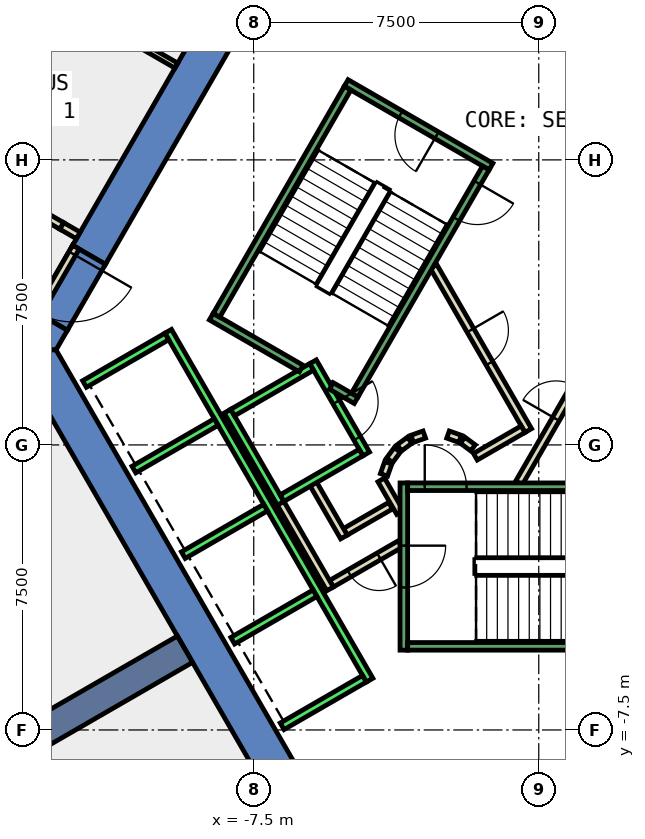
"""IFC4 building model, lengths in metres.
Left out: names, types, materials, properties, quantities, classifications, styles, units other than length and angle.
Written with IfcOpenShell. Run it as: python <this file> out.ifc"""

import sys

from ifc_helpers import new_model, si_unit, direction, frame, frame_2d, origin, place, context, subcontext, project, spatial, polyline, rectangle, outline, extrude, element, fill, save


model = new_model("IFC4")
c1 = context("Model", 3, precision=1e-05, world=origin(), true_north=direction((0.0, 1.0)))
c2 = subcontext(c1, "Body", "Model", "MODEL_VIEW")
j1 = project(units=[si_unit("LENGTHUNIT", "METRE"), si_unit("PLANEANGLEUNIT", "RADIAN")], contexts=[c1])
p1 = place(None, origin())
s1 = spatial("IfcSite", under=j1, at=p1, CompositionType="ELEMENT")
p2 = place(p1, origin())
s2 = spatial("IfcBuilding", under=s1, at=p2, CompositionType="ELEMENT")
p3 = place(p2, frame((0.0, 0.0, 51.8)))
s3 = spatial("IfcBuildingStorey", under=s2, at=p3, CompositionType="ELEMENT", Elevation=51.8)
p4 = place(p3, frame((0.0, 0.0, -0.4)))
e1 = element("IfcWall", 1, at=p4, inside=s3, PredefinedType="SHEAR", context=c2, shape_type="SweptSolid", body=[
    extrude(outline(polyline([(-12.267, 5.252), (-11.402, 4.752), (-6.351, 13.5), (-6.928, 14.5), (-12.267, 5.252)])), origin(), (0.0, 0.0, 1.0), 4.2),
])
p5 = place(p3, frame((0.0, 0.0, -0.4)))
e2 = element("IfcWall", 2, at=p5, inside=s3, PredefinedType="SHEAR", context=c2, shape_type="SweptSolid", body=[
    extrude(outline(polyline([(-12.402, 3.02), (-13.267, 3.52), (-13.856, 2.5), (-12.702, 2.5), (-12.402, 3.02)])), origin(), (0.0, 0.0, 1.0), 4.2),
])
p6 = place(p3, frame((0.0, 0.0, 3.6)))
e3 = element("IfcWall", 3, at=p6, inside=s3, PredefinedType="SHEAR", context=c2, shape_type="SweptSolid", body=[
    extrude(outline(polyline([(-13.267, 3.52), (-12.402, 3.02), (-11.402, 4.752), (-12.267, 5.252), (-13.267, 3.52)])), origin(), (0.0, 0.0, 1.0), 0.2),
])
p7 = place(p3, frame((0.0, 0.0, -0.4)))
e4 = element("IfcWall", 4, at=p7, inside=s3, PredefinedType="SHEAR", context=c2, shape_type="SweptSolid", body=[
    extrude(outline(polyline([(-13.856, 2.5), (-6.928, -9.5), (-6.351, -8.5), (-12.702, 2.5), (-13.856, 2.5)])), origin(), (0.0, 0.0, 1.0), 4.2),
])
p8 = place(p3, frame((-9.31, -5.375, -0.4), z_axis=(0.0, 0.0, 1.0), x_axis=(-0.866017533419, -0.500013631625, 0.0)))
e5 = element("IfcWall", 5, at=p8, inside=s3, PredefinedType="SHEAR", context=c2, shape_type="SweptSolid", body=[
    extrude(rectangle(XDim=9.0, YDim=0.8, at=frame_2d((4.5, 0.0))), origin(), (0.0, 0.0, 1.0), 4.2),
])
p9 = place(p3, frame((-16.96, 8.308, 0.0), z_axis=(0.0, 0.0, 1.0), x_axis=(0.866018717003, -0.500011581666, 0.0)))
e6 = element("IfcWall", 6, at=p9, inside=s3, PredefinedType="PARTITIONING", context=c2, shape_type="SweptSolid", body=[
    extrude(rectangle(XDim=5.092, YDim=0.2, at=frame_2d((2.546, 0.0))), origin(), (0.0, 0.0, 1.0), 3.8),
])
p10 = place(p9, frame((2.296, 0.0, 0.0)))
e7 = element("IfcOpeningElement", 7, at=p10, cuts=e6, PredefinedType="OPENING", context=c2, shape_type="SweptSolid", body=[
    extrude(rectangle(XDim=1.0, YDim=2.1, at=frame_2d((0.5, 1.05))), frame((0.0, 0.11, 0.0), z_axis=(0.0, -1.0, 0.0), x_axis=(1.0, 0.0, 0.0)), (0.0, 0.0, 1.0), 0.22),
])
p11 = place(p3, frame((-3.9, -1.599, 0.0), z_axis=(0.0, 0.0, 1.0), x_axis=(-0.865969445389, -0.500096910261, 0.0)))
e8 = element("IfcWall", 8, at=p11, inside=s3, PredefinedType="PARTITIONING", context=c2, shape_type="SweptSolid", body=[
    extrude(rectangle(XDim=1.373, YDim=0.2, at=frame_2d((0.687, 0.0))), origin(), (0.0, 0.0, 1.0), 3.8),
])
p12 = place(p3, frame((-5.126, -2.422, 0.0), z_axis=(0.0, 0.0, 1.0), x_axis=(-0.500062241894, 0.865989465428, 0.0)))
e9 = element("IfcWall", 9, at=p12, inside=s3, PredefinedType="PARTITIONING", context=c2, shape_type="SweptSolid", body=[
    extrude(rectangle(XDim=1.7, YDim=0.2, at=frame_2d((0.85, 0.0))), origin(), (0.0, 0.0, 1.0), 3.8),
])
p13 = place(p3, frame((-3.65, -2.61, 0.0), z_axis=(0.0, 0.0, 1.0), x_axis=(-0.866072462134, -0.499918483688, 0.0)))
e10 = element("IfcWall", 10, at=p13, inside=s3, PredefinedType="PARTITIONING", context=c2, shape_type="SweptSolid", body=[
    extrude(rectangle(XDim=2.084, YDim=0.2, at=frame_2d((1.042, 0.0))), origin(), (0.0, 0.0, 1.0), 3.8),
])
p14 = place(p13, frame((0.642, 0.0, 0.0)))
e11 = element("IfcOpeningElement", 11, at=p14, cuts=e10, PredefinedType="OPENING", context=c2, shape_type="SweptSolid", body=[
    extrude(rectangle(XDim=0.9, YDim=2.1, at=frame_2d((0.45, 1.05))), frame((0.0, 0.11, 0.0), z_axis=(0.0, -1.0, 0.0), x_axis=(1.0, 0.0, 0.0)), (0.0, 0.0, 1.0), 0.22),
])
p15 = place(p3, frame((-5.492, -3.788, 0.0), z_axis=(0.0, 0.0, 1.0), x_axis=(-0.500008949224, 0.866020236886, 0.0)))
e12 = element("IfcWall", 12, at=p15, inside=s3, PredefinedType="PARTITIONING", context=c2, shape_type="SweptSolid", body=[
    extrude(rectangle(XDim=2.68, YDim=0.2, at=frame_2d((1.34, 0.0))), origin(), (0.0, 0.0, 1.0), 3.8),
])
p16 = place(p3, frame((-4.145, -0.92, 0.0), z_axis=(0.0, 0.0, 1.0), x_axis=(0.499743786207, -0.866173278362, 0.0)))
e13 = element("IfcWall", 13, at=p16, inside=s3, PredefinedType="PARTITIONING", context=c2, shape_type="SweptSolid", body=[
    extrude(rectangle(XDim=0.991, YDim=0.2, at=frame_2d((0.495, 0.0))), origin(), (0.0, 0.0, 1.0), 3.8),
])
p17 = place(p3, frame((-14.377, 12.775, 0.0), z_axis=(0.0, 0.0, 1.0), x_axis=(0.866051730117, -0.499954398681, 0.0)))
e14 = element("IfcWall", 14, at=p17, inside=s3, PredefinedType="PARTITIONING", context=c2, shape_type="SweptSolid", body=[
    extrude(rectangle(XDim=5.588, YDim=0.15, at=frame_2d((2.794, 0.0))), origin(), (0.0, 0.0, 1.0), 3.8),
])
p18 = place(p3, frame((-0.52, -1.0, 0.0), z_axis=(0.0, 0.0, 1.0), x_axis=(0.50011622646, 0.865958290007, 0.0)))
e15 = element("IfcWall", 15, at=p18, inside=s3, PredefinedType="PARTITIONING", context=c2, shape_type="SweptSolid", body=[
    extrude(rectangle(XDim=4.991, YDim=0.2, at=frame_2d((2.496, 0.0))), origin(), (0.0, 0.0, 1.0), 3.8),
])
p19 = place(p18, frame((1.945, 0.0, 0.0)))
e16 = element("IfcOpeningElement", 16, at=p19, cuts=e15, PredefinedType="OPENING", context=c2, shape_type="SweptSolid", body=[
    extrude(rectangle(XDim=1.0, YDim=2.1, at=frame_2d((0.5, 1.05))), frame((0.0, 0.11, 0.0), z_axis=(0.0, -1.0, 0.0), x_axis=(1.0, 0.0, 0.0)), (0.0, 0.0, 1.0), 0.22),
])
p20 = place(p3, frame((-2.771, 4.7, 0.0), z_axis=(0.0, 0.0, 1.0), x_axis=(0.499969479948, -0.866043023828, 0.0)))
e17 = element("IfcWall", 17, at=p20, inside=s3, PredefinedType="PARTITIONING", context=c2, shape_type="SweptSolid", body=[
    extrude(rectangle(XDim=4.99, YDim=0.2, at=frame_2d((2.495, 0.0))), origin(), (0.0, 0.0, 1.0), 3.8),
])
p21 = place(p20, frame((1.945, 0.0, 0.0)))
e18 = element("IfcOpeningElement", 18, at=p21, cuts=e17, PredefinedType="OPENING", context=c2, shape_type="SweptSolid", body=[
    extrude(rectangle(XDim=1.0, YDim=2.1, at=frame_2d((0.5, 1.05))), frame((0.0, 0.11, 0.0), z_axis=(0.0, -1.0, 0.0), x_axis=(1.0, 0.0, 0.0)), (0.0, 0.0, 1.0), 0.22),
])
p22 = place(p3, frame((-0.412, 0.414, 0.0), z_axis=(0.0, 0.0, 1.0), x_axis=(-0.866017369001, -0.500013916395, 0.0)))
e19 = element("IfcWall", 19, at=p22, inside=s3, PredefinedType="PARTITIONING", context=c2, shape_type="SweptSolid", body=[
    extrude(rectangle(XDim=1.45, YDim=0.2, at=frame_2d((0.725, 0.0))), origin(), (0.0, 0.0, 1.0), 3.8),
])
p23 = place(p3, frame((-1.731, -0.077, 0.0), z_axis=(0.0, 0.0, 1.0), x_axis=(-0.804311165252, 0.594208338422, 0.0)))
e20 = element("IfcWall", 20, at=p23, inside=s3, PredefinedType="PARTITIONING", context=c2, shape_type="SweptSolid", body=[
    extrude(rectangle(XDim=0.338, YDim=0.2, at=frame_2d((0.169, 0.0))), origin(), (0.0, 0.0, 1.0), 3.8),
])
p24 = place(p3, frame((-2.07, 0.16, 0.0), z_axis=(0.0, 0.0, 1.0), x_axis=(-0.942199461132, 0.335052496547, 0.0)))
e21 = element("IfcWall", 21, at=p24, inside=s3, PredefinedType="PARTITIONING", context=c2, shape_type="SweptSolid", body=[
    extrude(rectangle(XDim=0.337, YDim=0.2, at=frame_2d((0.169, 0.0))), origin(), (0.0, 0.0, 1.0), 3.8),
])
p25 = place(p3, frame((-3.012, 0.273, 0.0), z_axis=(0.0, 0.0, 1.0), x_axis=(-0.942280615813, -0.334824194261, 0.0)))
e22 = element("IfcWall", 22, at=p25, inside=s3, PredefinedType="PARTITIONING", context=c2, shape_type="SweptSolid", body=[
    extrude(rectangle(XDim=0.338, YDim=0.2, at=frame_2d((0.169, 0.0))), origin(), (0.0, 0.0, 1.0), 3.8),
])
p26 = place(p3, frame((-3.397, 0.124, 0.0), z_axis=(0.0, 0.0, 1.0), x_axis=(-0.804311165252, -0.594208338422, 0.0)))
e23 = element("IfcWall", 23, at=p26, inside=s3, PredefinedType="PARTITIONING", context=c2, shape_type="SweptSolid", body=[
    extrude(rectangle(XDim=0.338, YDim=0.2, at=frame_2d((0.169, 0.0))), origin(), (0.0, 0.0, 1.0), 3.8),
])
p27 = place(p3, frame((-3.723, -0.131, 0.0), z_axis=(0.0, 0.0, 1.0), x_axis=(-0.594675113454, -0.803966112121, 0.0)))
e24 = element("IfcWall", 24, at=p27, inside=s3, PredefinedType="PARTITIONING", context=c2, shape_type="SweptSolid", body=[
    extrude(rectangle(XDim=0.338, YDim=0.2, at=frame_2d((0.169, 0.0))), origin(), (0.0, 0.0, 1.0), 3.8),
])
p28 = place(p3, frame((-3.96, -0.47, 0.0), z_axis=(0.0, 0.0, 1.0), x_axis=(-0.334824194261, -0.942280615813, 0.0)))
e25 = element("IfcWall", 25, at=p28, inside=s3, PredefinedType="PARTITIONING", context=c2, shape_type="SweptSolid", body=[
    extrude(rectangle(XDim=0.338, YDim=0.2, at=frame_2d((0.169, 0.0))), origin(), (0.0, 0.0, 1.0), 3.8),
])
p29 = place(p3, frame((-12.18, 5.202, 0.0), z_axis=(0.0, 0.0, 1.0), x_axis=(-0.50002537861, -0.866010750942, 0.0)))
e26 = element("IfcWall", 26, at=p29, inside=s3, PredefinedType="PARTITIONING", context=c2, shape_type="SweptSolid", body=[
    extrude(rectangle(XDim=2.0, YDim=0.2, at=frame_2d((1.0, 0.0))), origin(), (0.0, 0.0, 1.0), 2.4),
])
p30 = place(p29, frame((0.19, 0.0, 0.0)))
e27 = element("IfcOpeningElement", 27, at=p30, cuts=e26, PredefinedType="OPENING", context=c2, shape_type="SweptSolid", body=[
    extrude(rectangle(XDim=1.8, YDim=2.1, at=frame_2d((0.9, 1.05))), frame((0.0, 0.11, 0.0), z_axis=(0.0, -1.0, 0.0), x_axis=(1.0, 0.0, 0.0)), (0.0, 0.0, 1.0), 0.22),
])
p31 = place(p3, frame((-12.55, 5.762, 0.0), z_axis=(0.0, 0.0, 1.0), x_axis=(0.866071776036, -0.499919672301, 0.0)))
e28 = element("IfcWall", 28, at=p31, inside=s3, PredefinedType="PARTITIONING", context=c2, shape_type="SweptSolid", body=[
    extrude(rectangle(XDim=0.5, YDim=0.2, at=frame_2d((0.25, 0.0))), origin(), (0.0, 0.0, 1.0), 2.4),
])
p32 = place(p3, frame((-5.94, 2.188, 0.0), z_axis=(0.0, 0.0, 1.0), x_axis=(0.49994636267, -0.866056369097, 0.0)))
e29 = element("IfcWall", 29, at=p32, inside=s3, PredefinedType="STANDARD", context=c2, shape_type="SweptSolid", body=[
    extrude(rectangle(XDim=2.8, YDim=0.2, at=frame_2d((1.4, 0.0))), origin(), (0.0, 0.0, 1.0), 3.8),
])
p33 = place(p32, frame((1.225, 0.0, 0.0)))
e30 = element("IfcOpeningElement", 30, at=p33, cuts=e29, PredefinedType="OPENING", context=c2, shape_type="SweptSolid", body=[
    extrude(rectangle(XDim=1.1, YDim=2.1, at=frame_2d((0.55, 1.05))), frame((0.0, 0.11, 0.0), z_axis=(0.0, -1.0, 0.0), x_axis=(1.0, 0.0, 0.0)), (0.0, 0.0, 1.0), 0.22),
])
p34 = place(p3, frame((-8.192, 0.888, 0.0), z_axis=(0.0, 0.0, 1.0), x_axis=(0.49994636267, -0.866056369097, 0.0)))
e31 = element("IfcWall", 31, at=p34, inside=s3, PredefinedType="STANDARD", context=c2, shape_type="SweptSolid", body=[
    extrude(rectangle(XDim=2.8, YDim=0.2, at=frame_2d((1.4, 0.0))), origin(), (0.0, 0.0, 1.0), 3.8),
])
for number, where, z_axis, x_axis in (
    (32, (-5.977, 2.052, 0.0), (0.0, 0.0, 1.0), (-0.866, -0.5, 0.0)),
    (33, (-4.677, -0.2, 0.0), (0.0, 0.0, 1.0), (-0.866, -0.5, 0.0)),
):
    element("IfcWall", number, at=place(p3, frame(where, z_axis=z_axis, x_axis=x_axis)), inside=s3, PredefinedType="STANDARD", context=c2, shape_type="SweptSolid", body=[
        extrude(rectangle(XDim=2.399, YDim=0.2, at=frame_2d((1.2, 0.0))), origin(), (0.0, 0.0, 1.0), 3.8),
    ])
p35 = place(p3, frame((-9.751, 2.99, 0.0), z_axis=(0.0, 0.0, 1.0), x_axis=(0.50000090737, -0.866024879913, 0.0)))
e34 = element("IfcWall", 34, at=p35, inside=s3, PredefinedType="STANDARD", context=c2, shape_type="SweptSolid", body=[
    extrude(rectangle(XDim=10.6, YDim=0.2, at=frame_2d((5.3, 0.0))), origin(), (0.0, 0.0, 1.0), 3.8),
])
p36 = place(p3, frame((-9.788, 2.853, 0.0), z_axis=(0.0, 0.0, 1.0), x_axis=(-0.865998541277, -0.500046524342, 0.0)))
e35 = element("IfcWall", 35, at=p36, inside=s3, PredefinedType="STANDARD", context=c2, shape_type="SweptSolid", body=[
    extrude(rectangle(XDim=2.5, YDim=0.2, at=frame_2d((1.25, 0.0))), origin(), (0.0, 0.0, 1.0), 3.8),
])
for number, where, z_axis, x_axis in (
    (36, (-8.488, 0.602, 0.0), (0.0, 0.0, 1.0), (-0.866, -0.5, 0.0)),
    (37, (-7.188, -1.65, 0.0), (0.0, 0.0, 1.0), (-0.866, -0.5, 0.0)),
    (38, (-5.888, -3.902, 0.0), (0.0, 0.0, 1.0), (-0.866, -0.5, 0.0)),
    (39, (-4.588, -6.153, 0.0), (0.0, 0.0, 1.0), (-0.866, -0.5, 0.0)),
):
    element("IfcWall", number, at=place(p3, frame(where, z_axis=z_axis, x_axis=x_axis)), inside=s3, PredefinedType="STANDARD", context=c2, shape_type="SweptSolid", body=[
        extrude(rectangle(XDim=2.5, YDim=0.2, at=frame_2d((1.25, 0.0))), origin(), (0.0, 0.0, 1.0), 3.8),
    ])
p37 = place(p3, frame((-3.55, -1.0, 0.0), z_axis=(0.0, 0.0, 1.0), x_axis=(0.0, -1.0, 0.0)))
e40 = element("IfcWall", 40, at=p37, inside=s3, PredefinedType="STANDARD", context=c2, shape_type="SweptSolid", body=[
    extrude(rectangle(XDim=4.4, YDim=0.2, at=frame_2d((2.2, 0.0))), origin(), (0.0, 0.0, 1.0), 3.8),
])
p38 = place(p37, frame((1.65, 0.0, 0.0)))
e41 = element("IfcOpeningElement", 41, at=p38, cuts=e40, PredefinedType="OPENING", context=c2, shape_type="SweptSolid", body=[
    extrude(rectangle(XDim=1.1, YDim=2.2, at=frame_2d((0.55, 1.1))), frame((0.0, 0.11, 0.0), z_axis=(0.0, -1.0, 0.0), x_axis=(1.0, 0.0, 0.0)), (0.0, 0.0, 1.0), 0.22),
])
p39 = place(p3, frame((-3.45, -1.1, 0.0), z_axis=(0.0, 0.0, 1.0), x_axis=(1.0, 0.0, 0.0)))
e42 = element("IfcWall", 42, at=p39, inside=s3, PredefinedType="STANDARD", context=c2, shape_type="SweptSolid", body=[
    extrude(rectangle(XDim=6.9, YDim=0.2, at=frame_2d((3.45, 0.0))), origin(), (0.0, 0.0, 1.0), 3.8),
])
p40 = place(p39, frame((0.45, 0.0, 0.0)))
e43 = element("IfcOpeningElement", 43, at=p40, cuts=e42, PredefinedType="OPENING", context=c2, shape_type="SweptSolid", body=[
    extrude(rectangle(XDim=1.1, YDim=2.2, at=frame_2d((0.55, 1.1))), frame((0.0, 0.11, 0.0), z_axis=(0.0, -1.0, 0.0), x_axis=(1.0, 0.0, 0.0)), (0.0, 0.0, 1.0), 0.22),
])
p41 = place(p3, frame((-3.45, -5.3, 0.0), z_axis=(0.0, 0.0, 1.0), x_axis=(1.0, 0.0, 0.0)))
e44 = element("IfcWall", 44, at=p41, inside=s3, PredefinedType="STANDARD", context=c2, shape_type="SweptSolid", body=[
    extrude(rectangle(XDim=6.9, YDim=0.2, at=frame_2d((3.45, 0.0))), origin(), (0.0, 0.0, 1.0), 3.8),
])
p42 = place(p3, frame((-1.256, 7.324, 0.0), z_axis=(0.0, 0.0, 1.0), x_axis=(-0.866046073146, 0.499964197906, 0.0)))
e45 = element("IfcWall", 45, at=p42, inside=s3, PredefinedType="STANDARD", context=c2, shape_type="SweptSolid", body=[
    extrude(rectangle(XDim=4.4, YDim=0.2, at=frame_2d((2.2, 0.0))), origin(), (0.0, 0.0, 1.0), 3.8),
])
p43 = place(p42, frame((1.65, 0.0, 0.0)))
e46 = element("IfcOpeningElement", 46, at=p43, cuts=e45, PredefinedType="OPENING", context=c2, shape_type="SweptSolid", body=[
    extrude(rectangle(XDim=1.1, YDim=2.2, at=frame_2d((0.55, 1.1))), frame((0.0, 0.11, 0.0), z_axis=(0.0, -1.0, 0.0), x_axis=(1.0, 0.0, 0.0)), (0.0, 0.0, 1.0), 0.22),
])
p44 = place(p3, frame((-6.25, 2.01, 0.0), z_axis=(0.0, 0.0, 1.0), x_axis=(-0.86611865017, 0.499838457731, 0.0)))
e47 = element("IfcWall", 47, at=p44, inside=s3, PredefinedType="STANDARD", context=c2, shape_type="SweptSolid", body=[
    extrude(rectangle(XDim=2.733, YDim=0.2, at=frame_2d((1.366, 0.0))), origin(), (0.0, 0.0, 1.0), 3.8),
])
p45 = place(p3, frame((-4.806, 1.176, 0.0), z_axis=(0.0, 0.0, 1.0), x_axis=(-0.866558586415, 0.499075361355, 0.0)))
e48 = element("IfcWall", 48, at=p45, inside=s3, PredefinedType="STANDARD", context=c2, shape_type="SweptSolid", body=[
    extrude(rectangle(XDim=0.751, YDim=0.2, at=frame_2d((0.376, 0.0))), origin(), (0.0, 0.0, 1.0), 3.8),
])
p46 = place(p3, frame((-1.393, 7.288, 0.0), z_axis=(0.0, 0.0, 1.0), x_axis=(-0.499963383562, -0.866046543262, 0.0)))
e49 = element("IfcWall", 49, at=p46, inside=s3, PredefinedType="STANDARD", context=c2, shape_type="SweptSolid", body=[
    extrude(rectangle(XDim=6.9, YDim=0.2, at=frame_2d((3.45, 0.0))), origin(), (0.0, 0.0, 1.0), 3.8),
])
p47 = place(p46, frame((0.45, 0.0, 0.0)))
e50 = element("IfcOpeningElement", 50, at=p47, cuts=e49, PredefinedType="OPENING", context=c2, shape_type="SweptSolid", body=[
    extrude(rectangle(XDim=1.1, YDim=2.2, at=frame_2d((0.55, 1.1))), frame((0.0, 0.11, 0.0), z_axis=(0.0, -1.0, 0.0), x_axis=(1.0, 0.0, 0.0)), (0.0, 0.0, 1.0), 0.22),
])
p48 = place(p3, frame((-5.03, 9.388, 0.0), z_axis=(0.0, 0.0, 1.0), x_axis=(-0.499978703459, -0.866037698999, 0.0)))
e51 = element("IfcWall", 51, at=p48, inside=s3, PredefinedType="STANDARD", context=c2, shape_type="SweptSolid", body=[
    extrude(rectangle(XDim=6.9, YDim=0.2, at=frame_2d((3.45, 0.0))), origin(), (0.0, 0.0, 1.0), 3.8),
])
p49 = place(p19, origin())
e52 = element("IfcDoor", 52, at=p49, inside=s3, OperationType="SINGLE_SWING_LEFT", PredefinedType="DOOR", context=c2, shape_type="SweptSolid", body=[
    extrude(rectangle(XDim=1.0, YDim=2.1, at=frame_2d((0.5, 1.05))), frame((0.0, 0.025, 0.0), z_axis=(0.0, -1.0, 0.0), x_axis=(1.0, 0.0, 0.0)), (0.0, 0.0, 1.0), 0.05),
])
fill(e16, e52)
p50 = place(p21, origin())
e53 = element("IfcDoor", 53, at=p50, inside=s3, OperationType="SINGLE_SWING_RIGHT", PredefinedType="DOOR", context=c2, shape_type="SweptSolid", body=[
    extrude(rectangle(XDim=1.0, YDim=2.1, at=frame_2d((0.5, 1.05))), frame((0.0, 0.025, 0.0), z_axis=(0.0, -1.0, 0.0), x_axis=(1.0, 0.0, 0.0)), (0.0, 0.0, 1.0), 0.05),
])
fill(e18, e53)
p51 = place(p14, origin())
e54 = element("IfcDoor", 54, at=p51, inside=s3, OperationType="SINGLE_SWING_LEFT", PredefinedType="DOOR", context=c2, shape_type="SweptSolid", body=[
    extrude(rectangle(XDim=0.9, YDim=2.1, at=frame_2d((0.45, 1.05))), frame((0.0, 0.025, 0.0), z_axis=(0.0, -1.0, 0.0), x_axis=(1.0, 0.0, 0.0)), (0.0, 0.0, 1.0), 0.05),
])
fill(e11, e54)
p52 = place(p30, origin())
e55 = element("IfcDoor", 55, at=p52, inside=s3, OperationType="DOUBLE_DOOR_SINGLE_SWING", PredefinedType="DOOR", context=c2, shape_type="SweptSolid", body=[
    extrude(rectangle(XDim=1.8, YDim=2.1, at=frame_2d((0.9, 1.05))), frame((0.0, 0.025, 0.0), z_axis=(0.0, -1.0, 0.0), x_axis=(1.0, 0.0, 0.0)), (0.0, 0.0, 1.0), 0.05),
])
fill(e27, e55)
p53 = place(p33, origin())
e56 = element("IfcDoor", 56, at=p53, inside=s3, OperationType="SLIDING_TO_LEFT", PredefinedType="DOOR", context=c2, shape_type="SweptSolid", body=[
    extrude(rectangle(XDim=1.1, YDim=2.1, at=frame_2d((0.55, 1.05))), frame((0.0, 0.025, 0.0), z_axis=(0.0, -1.0, 0.0), x_axis=(1.0, 0.0, 0.0)), (0.0, 0.0, 1.0), 0.05),
])
fill(e30, e56)
p54 = place(p40, origin())
e57 = element("IfcDoor", 57, at=p54, inside=s3, OperationType="SINGLE_SWING_LEFT", PredefinedType="DOOR", context=c2, shape_type="SweptSolid", body=[
    extrude(rectangle(XDim=1.1, YDim=2.2, at=frame_2d((0.55, 1.1))), frame((0.0, 0.025, 0.0), z_axis=(0.0, -1.0, 0.0), x_axis=(1.0, 0.0, 0.0)), (0.0, 0.0, 1.0), 0.05),
])
fill(e43, e57)
p55 = place(p38, origin())
e58 = element("IfcDoor", 58, at=p55, inside=s3, OperationType="SINGLE_SWING_LEFT", PredefinedType="DOOR", context=c2, shape_type="SweptSolid", body=[
    extrude(rectangle(XDim=1.1, YDim=2.2, at=frame_2d((0.55, 1.1))), frame((0.0, 0.025, 0.0), z_axis=(0.0, -1.0, 0.0), x_axis=(1.0, 0.0, 0.0)), (0.0, 0.0, 1.0), 0.05),
])
fill(e41, e58)
p56 = place(p47, origin())
e59 = element("IfcDoor", 59, at=p56, inside=s3, OperationType="SINGLE_SWING_LEFT", PredefinedType="DOOR", context=c2, shape_type="SweptSolid", body=[
    extrude(rectangle(XDim=1.1, YDim=2.2, at=frame_2d((0.55, 1.1))), frame((0.0, 0.025, 0.0), z_axis=(0.0, -1.0, 0.0), x_axis=(1.0, 0.0, 0.0)), (0.0, 0.0, 1.0), 0.05),
])
fill(e50, e59)
p57 = place(p43, origin())
e60 = element("IfcDoor", 60, at=p57, inside=s3, OperationType="SINGLE_SWING_LEFT", PredefinedType="DOOR", context=c2, shape_type="SweptSolid", body=[
    extrude(rectangle(XDim=1.1, YDim=2.2, at=frame_2d((0.55, 1.1))), frame((0.0, 0.025, 0.0), z_axis=(0.0, -1.0, 0.0), x_axis=(1.0, 0.0, 0.0)), (0.0, 0.0, 1.0), 0.05),
])
fill(e46, e60)
save(model, sys.argv[1])
